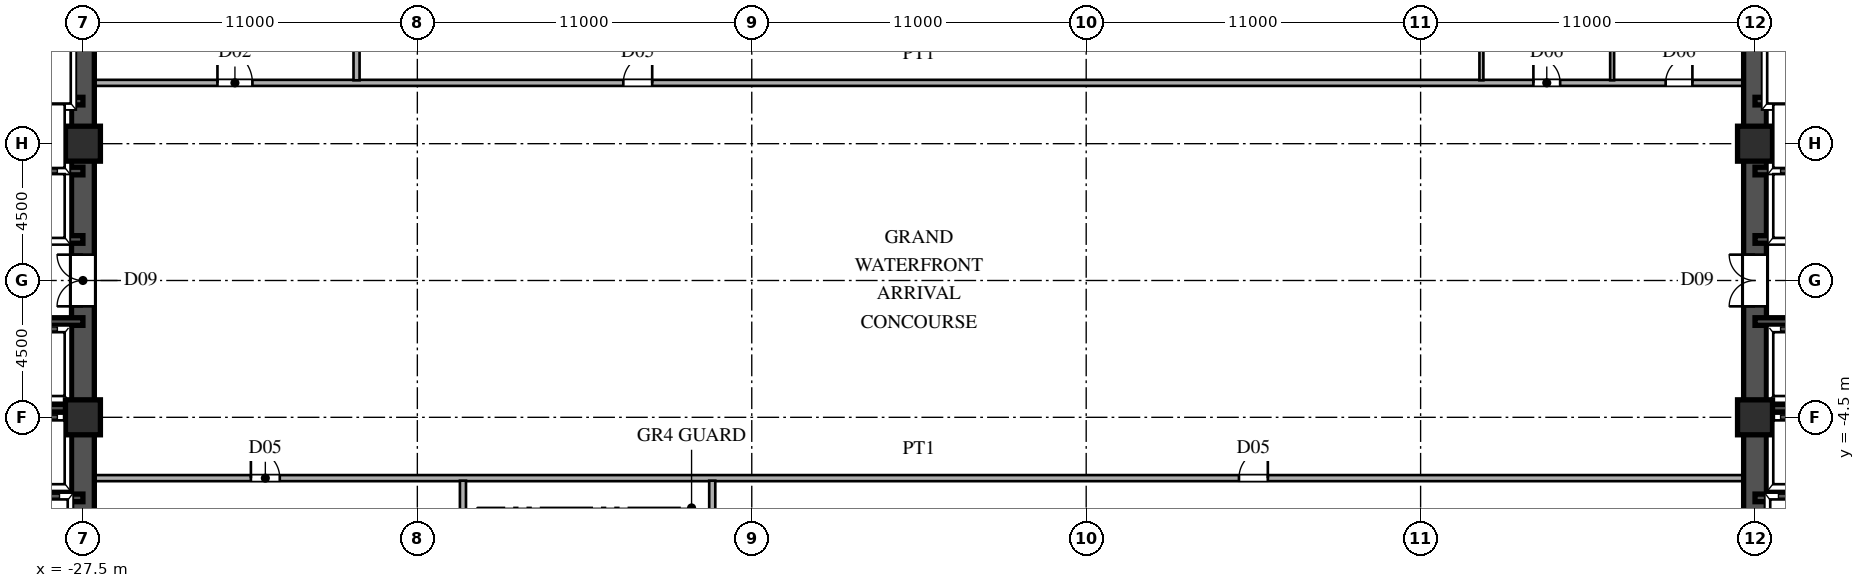
"""IFC4 building model, lengths in metres.
Left out: names, types, materials, properties, quantities, classifications, styles, units other than length and angle.
Written with IfcOpenShell. Run it as: python <this file> out.ifc"""

import sys

from ifc_helpers import new_model, si_unit, direction, frame, frame_2d, origin, origin_2d, place, context, subcontext, project, spatial, rectangle, hollow_rectangle, extrude, source, transform, mapped, element, fill, save


model = new_model("IFC4")
c1 = context("Model", 3, precision=1e-05, world=origin(), true_north=direction((0.0, 1.0)))
c2 = subcontext(c1, "Body", "Model", "MODEL_VIEW")
j1 = project(units=[si_unit("LENGTHUNIT", "METRE"), si_unit("PLANEANGLEUNIT", "RADIAN")], contexts=[c1])
p1 = place(None, origin())
s1 = spatial("IfcSite", under=j1, at=p1, CompositionType="ELEMENT")
p2 = place(p1, origin())
s2 = spatial("IfcBuilding", under=s1, at=p2, CompositionType="ELEMENT")
p3 = place(p2, origin())
s3 = spatial("IfcBuildingStorey", under=s2, at=p3, CompositionType="ELEMENT", Elevation=0.0)
m1 = source(origin(), c2, "Body", "SweptSolid", [
    extrude(hollow_rectangle(XDim=1.15, YDim=1.15, WallThickness=0.048, at=origin_2d()), origin(), (0.0, 0.0, 1.0), 5.4),
])
for number, where, z_axis, x_axis in (
    (1, (-27.5, -4.5, 0.0), (0.0, 0.0, 1.0), (1.0, 0.0, 0.0)),
    (2, (-27.5, 4.5, 0.0), (0.0, 0.0, 1.0), (1.0, 0.0, 0.0)),
    (3, (27.5, -4.5, 0.0), (0.0, 0.0, 1.0), (1.0, 0.0, 0.0)),
    (4, (27.5, 4.5, 0.0), (0.0, 0.0, 1.0), (1.0, 0.0, 0.0)),
):
    element("IfcColumn", number, at=place(p3, frame(where, z_axis=z_axis, x_axis=x_axis)), inside=s3, PredefinedType="COLUMN", context=c2, shape_type="MappedRepresentation", body=[
        mapped(m1, transform((0.0, 0.0, 0.0), scale=1.0)),
    ])
for number, where, z_axis, x_axis in (
    (5, (-27.5, -13.5, 0.0), (0.0, 0.0, 1.0), (0.0, 1.0, 0.0)),
    (6, (-27.5, 1.3, 0.0), (0.0, 0.0, 1.0), (0.0, 1.0, 0.0)),
):
    element("IfcWall", number, at=place(p3, frame(where, z_axis=z_axis, x_axis=x_axis)), inside=s3, PredefinedType="SHEAR", context=c2, shape_type="SweptSolid", body=[
        extrude(rectangle(XDim=12.2, YDim=0.75, at=frame_2d((6.1, 0.0))), origin(), (0.0, 0.0, 1.0), 5.12),
    ])
p4 = place(p3, frame((-27.5, -1.3, 0.0), z_axis=(0.0, 0.0, 1.0), x_axis=(0.0, 1.0, 0.0)))
e7 = element("IfcWall", 7, at=p4, inside=s3, PredefinedType="SHEAR", context=c2, shape_type="SweptSolid", body=[
    extrude(rectangle(XDim=2.6, YDim=0.75, at=frame_2d((1.3, 0.0))), origin(), (0.0, 0.0, 1.0), 5.12),
])
p5 = place(p4, frame((0.45, 0.0, 0.0)))
e8 = element("IfcOpeningElement", 8, at=p5, cuts=e7, PredefinedType="OPENING", context=c2, shape_type="SweptSolid", body=[
    extrude(rectangle(XDim=1.7, YDim=2.35, at=frame_2d((0.85, 1.175))), frame((0.0, 0.385, 0.0), z_axis=(0.0, -1.0, 0.0), x_axis=(1.0, 0.0, 0.0)), (0.0, 0.0, 1.0), 0.77),
])
for number, where, z_axis, x_axis in (
    (9, (-30.3, -7.15, 0.0), (0.0, 0.0, 1.0), (1.0, 0.0, 0.0)),
    (10, (-30.3, -4.2, 0.0), (0.0, 0.0, 1.0), (1.0, 0.0, 0.0)),
    (11, (-30.3, -1.35, 0.0), (0.0, 0.0, 1.0), (1.0, 0.0, 0.0)),
    (12, (-30.3, 1.35, 0.0), (0.0, 0.0, 1.0), (1.0, 0.0, 0.0)),
    (13, (-30.3, 3.6, 0.0), (0.0, 0.0, 1.0), (1.0, 0.0, 0.0)),
    (14, (-30.3, 5.9, 0.0), (0.0, 0.0, 1.0), (1.0, 0.0, 0.0)),
):
    element("IfcWall", number, at=place(p3, frame(where, z_axis=z_axis, x_axis=x_axis)), inside=s3, PredefinedType="SHEAR", context=c2, shape_type="SweptSolid", body=[
        extrude(rectangle(XDim=2.8, YDim=0.25, at=frame_2d((1.4, 0.0))), origin(), (0.0, 0.0, 1.0), 5.12),
    ])
for number, where, z_axis, x_axis in (
    (15, (27.5, -13.5, 0.0), (0.0, 0.0, 1.0), (0.0, 1.0, 0.0)),
    (16, (27.5, 1.3, 0.0), (0.0, 0.0, 1.0), (0.0, 1.0, 0.0)),
):
    element("IfcWall", number, at=place(p3, frame(where, z_axis=z_axis, x_axis=x_axis)), inside=s3, PredefinedType="SHEAR", context=c2, shape_type="SweptSolid", body=[
        extrude(rectangle(XDim=12.2, YDim=0.75, at=frame_2d((6.1, 0.0))), origin(), (0.0, 0.0, 1.0), 5.12),
    ])
p6 = place(p3, frame((27.5, -1.3, 0.0), z_axis=(0.0, 0.0, 1.0), x_axis=(0.0, 1.0, 0.0)))
e17 = element("IfcWall", 17, at=p6, inside=s3, PredefinedType="SHEAR", context=c2, shape_type="SweptSolid", body=[
    extrude(rectangle(XDim=2.6, YDim=0.75, at=frame_2d((1.3, 0.0))), origin(), (0.0, 0.0, 1.0), 5.12),
])
p7 = place(p6, frame((0.45, 0.0, 0.0)))
e18 = element("IfcOpeningElement", 18, at=p7, cuts=e17, PredefinedType="OPENING", context=c2, shape_type="SweptSolid", body=[
    extrude(rectangle(XDim=1.7, YDim=2.35, at=frame_2d((0.85, 1.175))), frame((0.0, 0.385, 0.0), z_axis=(0.0, -1.0, 0.0), x_axis=(1.0, 0.0, 0.0)), (0.0, 0.0, 1.0), 0.77),
])
for number, where, z_axis, x_axis in (
    (19, (27.5, -7.15, 0.0), (0.0, 0.0, 1.0), (1.0, 0.0, 0.0)),
    (20, (27.5, -4.2, 0.0), (0.0, 0.0, 1.0), (1.0, 0.0, 0.0)),
    (21, (27.5, -1.35, 0.0), (0.0, 0.0, 1.0), (1.0, 0.0, 0.0)),
    (22, (27.5, 1.35, 0.0), (0.0, 0.0, 1.0), (1.0, 0.0, 0.0)),
    (23, (27.5, 3.6, 0.0), (0.0, 0.0, 1.0), (1.0, 0.0, 0.0)),
    (24, (27.5, 5.9, 0.0), (0.0, 0.0, 1.0), (1.0, 0.0, 0.0)),
):
    element("IfcWall", number, at=place(p3, frame(where, z_axis=z_axis, x_axis=x_axis)), inside=s3, PredefinedType="SHEAR", context=c2, shape_type="SweptSolid", body=[
        extrude(rectangle(XDim=2.8, YDim=0.25, at=frame_2d((1.4, 0.0))), origin(), (0.0, 0.0, 1.0), 5.12),
    ])
p8 = place(p3, frame((-27.12, -6.5, 0.0), z_axis=(0.0, 0.0, 1.0), x_axis=(1.0, 0.0, 0.0)))
e25 = element("IfcWall", 25, at=p8, inside=s3, PredefinedType="PARTITIONING", context=c2, shape_type="SweptSolid", body=[
    extrude(rectangle(XDim=54.24, YDim=0.2, at=frame_2d((27.12, 0.0))), origin(), (0.0, 0.0, 1.0), 5.12),
])
p9 = place(p8, frame((5.145, 0.0, 0.0)))
e26 = element("IfcOpeningElement", 26, at=p9, cuts=e25, PredefinedType="OPENING", context=c2, shape_type="SweptSolid", body=[
    extrude(rectangle(XDim=0.95, YDim=2.15, at=frame_2d((0.475, 1.075))), frame((0.0, 0.11, 0.0), z_axis=(0.0, -1.0, 0.0), x_axis=(1.0, 0.0, 0.0)), (0.0, 0.0, 1.0), 0.22),
])
p10 = place(p8, frame((37.645, 0.0, 0.0)))
e27 = element("IfcOpeningElement", 27, at=p10, cuts=e25, PredefinedType="OPENING", context=c2, shape_type="SweptSolid", body=[
    extrude(rectangle(XDim=0.95, YDim=2.15, at=frame_2d((0.475, 1.075))), frame((0.0, 0.11, 0.0), z_axis=(0.0, -1.0, 0.0), x_axis=(1.0, 0.0, 0.0)), (0.0, 0.0, 1.0), 0.22),
])
p11 = place(p3, frame((-27.12, 6.5, 0.0), z_axis=(0.0, 0.0, 1.0), x_axis=(1.0, 0.0, 0.0)))
e28 = element("IfcWall", 28, at=p11, inside=s3, PredefinedType="PARTITIONING", context=c2, shape_type="SweptSolid", body=[
    extrude(rectangle(XDim=54.24, YDim=0.2, at=frame_2d((27.12, 0.0))), origin(), (0.0, 0.0, 1.0), 5.12),
])
p12 = place(p11, frame((4.045, 0.0, 0.0)))
e29 = element("IfcOpeningElement", 29, at=p12, cuts=e28, PredefinedType="OPENING", context=c2, shape_type="SweptSolid", body=[
    extrude(rectangle(XDim=1.15, YDim=2.2, at=frame_2d((0.575, 1.1))), frame((0.0, 0.11, 0.0), z_axis=(0.0, -1.0, 0.0), x_axis=(1.0, 0.0, 0.0)), (0.0, 0.0, 1.0), 0.22),
])
p13 = place(p11, frame((17.395, 0.0, 0.0)))
e30 = element("IfcOpeningElement", 30, at=p13, cuts=e28, PredefinedType="OPENING", context=c2, shape_type="SweptSolid", body=[
    extrude(rectangle(XDim=0.95, YDim=2.15, at=frame_2d((0.475, 1.075))), frame((0.0, 0.11, 0.0), z_axis=(0.0, -1.0, 0.0), x_axis=(1.0, 0.0, 0.0)), (0.0, 0.0, 1.0), 0.22),
])
p14 = place(p11, frame((47.33, 0.0, 0.0)))
e31 = element("IfcOpeningElement", 31, at=p14, cuts=e28, PredefinedType="OPENING", context=c2, shape_type="SweptSolid", body=[
    extrude(rectangle(XDim=0.88, YDim=2.1, at=frame_2d((0.44, 1.05))), frame((0.0, 0.11, 0.0), z_axis=(0.0, -1.0, 0.0), x_axis=(1.0, 0.0, 0.0)), (0.0, 0.0, 1.0), 0.22),
])
p15 = place(p11, frame((51.68, 0.0, 0.0)))
e32 = element("IfcOpeningElement", 32, at=p15, cuts=e28, PredefinedType="OPENING", context=c2, shape_type="SweptSolid", body=[
    extrude(rectangle(XDim=0.88, YDim=2.1, at=frame_2d((0.44, 1.05))), frame((0.0, 0.11, 0.0), z_axis=(0.0, -1.0, 0.0), x_axis=(1.0, 0.0, 0.0)), (0.0, 0.0, 1.0), 0.22),
])
for number, where, z_axis, x_axis in (
    (33, (-18.5, 6.585, 0.0), (0.0, 0.0, 1.0), (0.0, 1.0, 0.0)),
    (34, (-15.0, -31.8, 0.0), (0.0, 0.0, 1.0), (0.0, 1.0, 0.0)),
    (35, (-6.8, -31.8, 0.0), (0.0, 0.0, 1.0), (0.0, 1.0, 0.0)),
):
    element("IfcWall", number, at=place(p3, frame(where, z_axis=z_axis, x_axis=x_axis)), inside=s3, PredefinedType="PARTITIONING", context=c2, shape_type="SweptSolid", body=[
        extrude(rectangle(XDim=25.215, YDim=0.2, at=frame_2d((12.607, 0.0))), origin(), (0.0, 0.0, 1.0), 5.12),
    ])
p16 = place(p3, frame((18.5, 6.585, 0.0), z_axis=(0.0, 0.0, 1.0), x_axis=(0.0, 1.0, 0.0)))
e36 = element("IfcWall", 36, at=p16, inside=s3, PredefinedType="PARTITIONING", context=c2, shape_type="SweptSolid", body=[
    extrude(rectangle(XDim=8.83, YDim=0.13, at=frame_2d((4.415, 0.0))), origin(), (0.0, 0.0, 1.0), 5.12),
])
p17 = place(p16, frame((6.475, 0.0, 0.0)))
e37 = element("IfcOpeningElement", 37, at=p17, cuts=e36, PredefinedType="OPENING", context=c2, shape_type="SweptSolid", body=[
    extrude(rectangle(XDim=0.88, YDim=2.1, at=frame_2d((0.44, 1.05))), frame((0.0, 0.075, 0.0), z_axis=(0.0, -1.0, 0.0), x_axis=(1.0, 0.0, 0.0)), (0.0, 0.0, 1.0), 0.15),
])
p18 = place(p3, frame((22.8, 6.585, 0.0), z_axis=(0.0, 0.0, 1.0), x_axis=(0.0, 1.0, 0.0)))
e38 = element("IfcWall", 38, at=p18, inside=s3, PredefinedType="PARTITIONING", context=c2, shape_type="SweptSolid", body=[
    extrude(rectangle(XDim=4.83, YDim=0.13, at=frame_2d((2.415, 0.0))), origin(), (0.0, 0.0, 1.0), 5.12),
])
m2 = source(origin(), c2, "Body", "SweptSolid", [
    extrude(rectangle(XDim=1.7, YDim=2.35, at=frame_2d((0.85, 1.175))), frame((0.0, 0.025, 0.0), z_axis=(0.0, -1.0, 0.0), x_axis=(1.0, 0.0, 0.0)), (0.0, 0.0, 1.0), 0.05),
])
p19 = place(p5, origin())
e39 = element("IfcDoor", 39, at=p19, inside=s3, OperationType="DOUBLE_SWING_LEFT", PredefinedType="DOOR", context=c2, shape_type="MappedRepresentation", body=[
    mapped(m2, transform((0.0, 0.0, 0.0), scale=1.0)),
])
fill(e8, e39)
p20 = place(p7, origin())
e40 = element("IfcDoor", 40, at=p20, inside=s3, OperationType="DOUBLE_SWING_LEFT", PredefinedType="DOOR", context=c2, shape_type="MappedRepresentation", body=[
    mapped(m2, transform((0.0, 0.0, 0.0), scale=1.0)),
])
fill(e18, e40)
m3 = source(origin(), c2, "Body", "SweptSolid", [
    extrude(rectangle(XDim=0.95, YDim=2.15, at=frame_2d((0.475, 1.075))), frame((0.0, 0.025, 0.0), z_axis=(0.0, -1.0, 0.0), x_axis=(1.0, 0.0, 0.0)), (0.0, 0.0, 1.0), 0.05),
])
p21 = place(p9, origin())
e41 = element("IfcDoor", 41, at=p21, inside=s3, OperationType="SINGLE_SWING_LEFT", PredefinedType="DOOR", context=c2, shape_type="MappedRepresentation", body=[
    mapped(m3, transform((0.0, 0.0, 0.0), scale=1.0)),
])
fill(e26, e41)
p22 = place(p10, origin())
e42 = element("IfcDoor", 42, at=p22, inside=s3, OperationType="SINGLE_SWING_RIGHT", PredefinedType="DOOR", context=c2, shape_type="MappedRepresentation", body=[
    mapped(m3, transform((0.0, 0.0, 0.0), scale=1.0)),
])
fill(e27, e42)
m4 = source(origin(), c2, "Body", "SweptSolid", [
    extrude(rectangle(XDim=1.15, YDim=2.2, at=frame_2d((0.575, 1.1))), frame((0.0, 0.025, 0.0), z_axis=(0.0, -1.0, 0.0), x_axis=(1.0, 0.0, 0.0)), (0.0, 0.0, 1.0), 0.05),
])
p23 = place(p12, origin())
e43 = element("IfcDoor", 43, at=p23, inside=s3, OperationType="SINGLE_SWING_LEFT", PredefinedType="DOOR", context=c2, shape_type="MappedRepresentation", body=[
    mapped(m4, transform((0.0, 0.0, 0.0), scale=1.0)),
])
fill(e29, e43)
p24 = place(p13, origin())
e44 = element("IfcDoor", 44, at=p24, inside=s3, OperationType="SINGLE_SWING_RIGHT", PredefinedType="DOOR", context=c2, shape_type="MappedRepresentation", body=[
    mapped(m3, transform((0.0, 0.0, 0.0), scale=1.0)),
])
fill(e30, e44)
m5 = source(origin(), c2, "Body", "SweptSolid", [
    extrude(rectangle(XDim=0.88, YDim=2.1, at=frame_2d((0.44, 1.05))), frame((0.0, 0.025, 0.0), z_axis=(0.0, -1.0, 0.0), x_axis=(1.0, 0.0, 0.0)), (0.0, 0.0, 1.0), 0.05),
])
p25 = place(p14, origin())
e45 = element("IfcDoor", 45, at=p25, inside=s3, OperationType="SINGLE_SWING_LEFT", PredefinedType="DOOR", context=c2, shape_type="MappedRepresentation", body=[
    mapped(m5, transform((0.0, 0.0, 0.0), scale=1.0)),
])
fill(e31, e45)
p26 = place(p15, origin())
e46 = element("IfcDoor", 46, at=p26, inside=s3, OperationType="SINGLE_SWING_RIGHT", PredefinedType="DOOR", context=c2, shape_type="MappedRepresentation", body=[
    mapped(m5, transform((0.0, 0.0, 0.0), scale=1.0)),
])
fill(e32, e46)
save(model, sys.argv[1])
